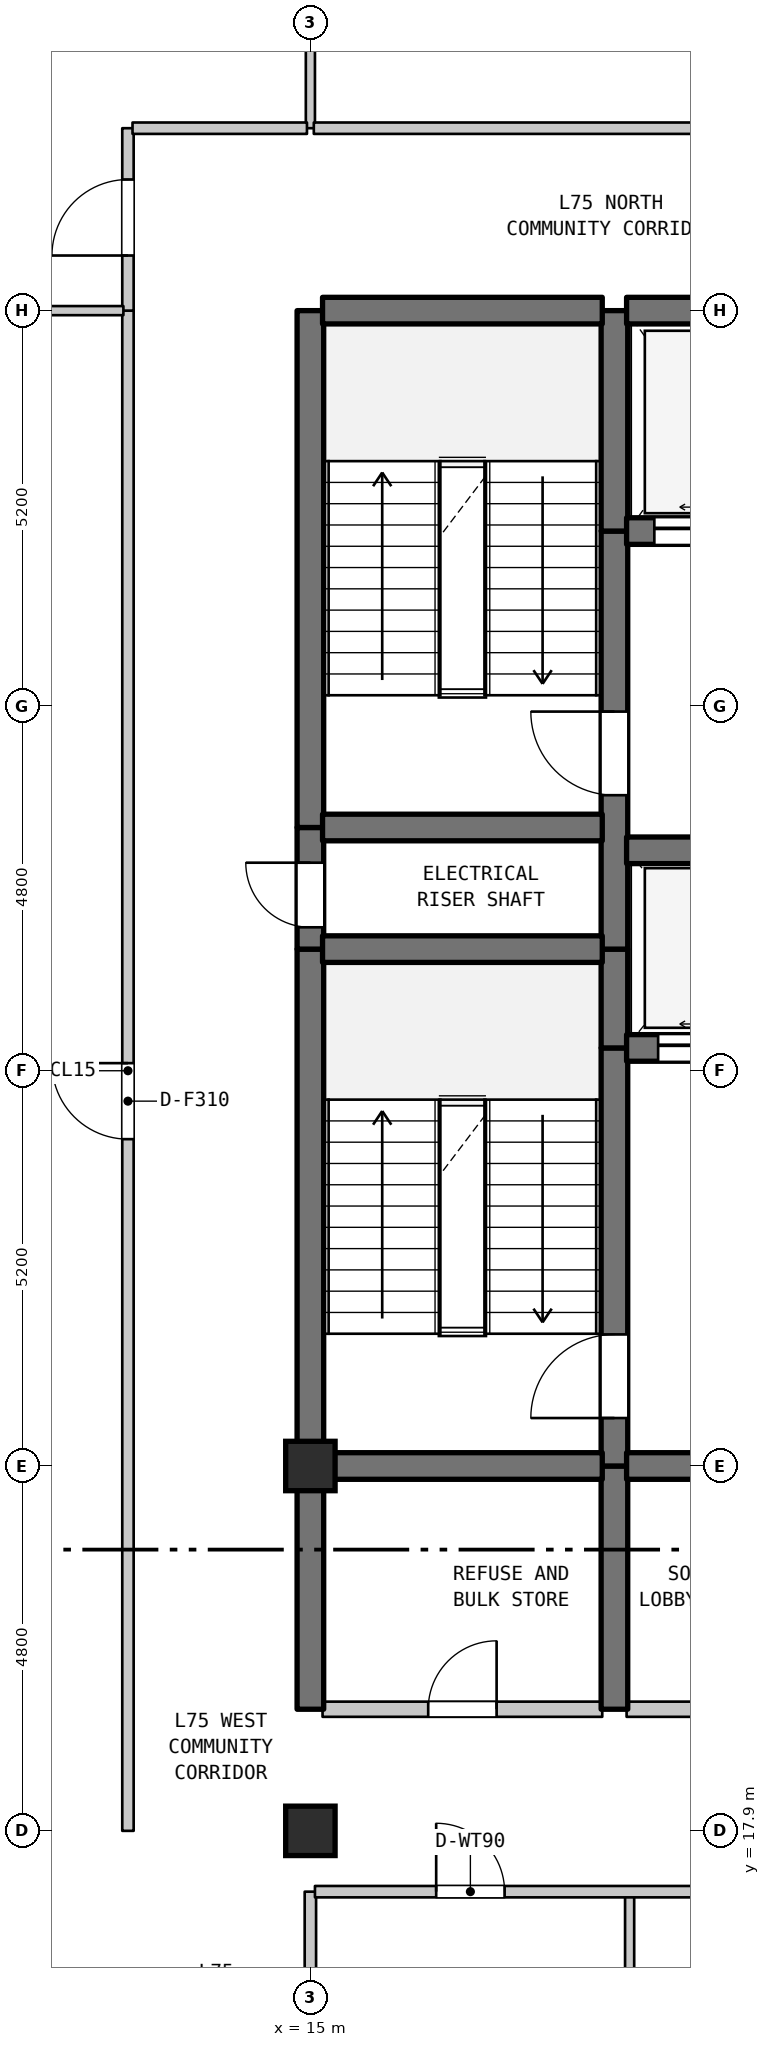
"""IFC4 building model, lengths in metres.
Left out: names, types, materials, properties, quantities, classifications, styles, units other than length and angle.
Written with IfcOpenShell. Run it as: python <this file> out.ifc"""

import sys

from ifc_helpers import new_model, si_unit, direction, frame, frame_2d, origin, origin_2d, place, context, subcontext, project, spatial, rectangle, extrude, element, fill, save


model = new_model("IFC4")
c1 = context("Model", 3, precision=1e-05, world=origin(), true_north=direction((0.0, 1.0)))
c2 = subcontext(c1, "Body", "Model", "MODEL_VIEW")
j1 = project(units=[si_unit("LENGTHUNIT", "METRE"), si_unit("PLANEANGLEUNIT", "RADIAN")], contexts=[c1])
p1 = place(None, origin())
s1 = spatial("IfcSite", under=j1, at=p1, CompositionType="ELEMENT")
p2 = place(p1, origin())
s2 = spatial("IfcBuilding", under=s1, at=p2, CompositionType="ELEMENT")
p3 = place(p2, frame((0.0, 0.0, 299.1)))
s3 = spatial("IfcBuildingStorey", under=s2, at=p3, CompositionType="ELEMENT", Elevation=299.1)
for number, where, z_axis, x_axis in (
    (1, (15.0, 17.9, 0.0), (0.0, 0.0, 1.0), (1.0, 0.0, 0.0)),
    (2, (15.0, 22.7, 0.0), (0.0, 0.0, 1.0), (1.0, 0.0, 0.0)),
):
    element("IfcColumn", number, at=place(p3, frame(where, z_axis=z_axis, x_axis=x_axis)), inside=s3, PredefinedType="COLUMN", context=c2, shape_type="SweptSolid", body=[
        extrude(rectangle(XDim=0.65, YDim=0.65, at=origin_2d()), origin(), (0.0, 0.0, 1.0), 4.5),
    ])
p4 = place(p3, frame((12.6, 17.9, 0.0), z_axis=(0.0, 0.0, 1.0), x_axis=(0.0, 1.0, 0.0)))
e3 = element("IfcWall", 3, at=p4, inside=s3, PredefinedType="STANDARD", context=c2, shape_type="SweptSolid", body=[
    extrude(rectangle(XDim=20.0, YDim=0.15, at=frame_2d((10.0, 0.0))), origin(), (0.0, 0.0, 1.0), 4.19),
])
p5 = place(p4, frame((9.1, 0.0, 0.0)))
e4 = element("IfcOpeningElement", 4, at=p5, cuts=e3, PredefinedType="OPENING", context=c2, shape_type="SweptSolid", body=[
    extrude(rectangle(XDim=1.0, YDim=2.15, at=frame_2d((0.5, 1.075))), frame((0.0, 0.085, 0.0), z_axis=(0.0, -1.0, 0.0), x_axis=(1.0, 0.0, 0.0)), (0.0, 0.0, 1.0), 0.17),
])
p6 = place(p3, frame((12.6, 37.9, 0.0), z_axis=(0.0, 0.0, 1.0), x_axis=(0.0, 1.0, 0.0)))
e5 = element("IfcWall", 5, at=p6, inside=s3, PredefinedType="STANDARD", context=c2, shape_type="SweptSolid", body=[
    extrude(rectangle(XDim=2.4, YDim=0.15, at=frame_2d((1.2, 0.0))), origin(), (0.0, 0.0, 1.0), 4.19),
])
p7 = place(p6, frame((0.725, 0.0, 0.0)))
e6 = element("IfcOpeningElement", 6, at=p7, cuts=e5, PredefinedType="OPENING", context=c2, shape_type="SweptSolid", body=[
    extrude(rectangle(XDim=1.0, YDim=2.15, at=frame_2d((0.5, 1.075))), frame((0.0, 0.085, 0.0), z_axis=(0.0, -1.0, 0.0), x_axis=(1.0, 0.0, 0.0)), (0.0, 0.0, 1.0), 0.17),
])
p8 = place(p3, frame((15.0, 13.0, 0.0), z_axis=(0.0, 0.0, 1.0), x_axis=(0.0, 1.0, 0.0)))
e7 = element("IfcWall", 7, at=p8, inside=s3, PredefinedType="STANDARD", context=c2, shape_type="SweptSolid", body=[
    extrude(rectangle(XDim=4.1, YDim=0.15, at=frame_2d((2.05, 0.0))), origin(), (0.0, 0.0, 1.0), 3.9),
])
p9 = place(p3, frame((15.0, 19.5, 0.0), z_axis=(0.0, 0.0, 1.0), x_axis=(0.0, 1.0, 0.0)))
e8 = element("IfcWall", 8, at=p9, inside=s3, PredefinedType="SHEAR", context=c2, shape_type="SweptSolid", body=[
    extrude(rectangle(XDim=3.2, YDim=0.35, at=frame_2d((1.6, 0.0))), origin(), (0.0, 0.0, 1.0), 4.19),
])
p10 = place(p3, frame((15.0, 22.7, 0.0), z_axis=(0.0, 0.0, 1.0), x_axis=(0.0, 1.0, 0.0)))
e9 = element("IfcWall", 9, at=p10, inside=s3, PredefinedType="SHEAR", context=c2, shape_type="SweptSolid", body=[
    extrude(rectangle(XDim=6.8, YDim=0.35, at=frame_2d((3.4, 0.0))), origin(), (0.0, 0.0, 1.0), 4.19),
])
p11 = place(p3, frame((15.0, 29.5, 0.0), z_axis=(0.0, 0.0, 1.0), x_axis=(0.0, 1.0, 0.0)))
e10 = element("IfcWall", 10, at=p11, inside=s3, PredefinedType="SHEAR", context=c2, shape_type="SweptSolid", body=[
    extrude(rectangle(XDim=1.6, YDim=0.35, at=frame_2d((0.8, 0.0))), origin(), (0.0, 0.0, 1.0), 4.19),
])
p12 = place(p11, frame((0.287, 0.0, 0.0)))
e11 = element("IfcOpeningElement", 11, at=p12, cuts=e10, PredefinedType="OPENING", context=c2, shape_type="SweptSolid", body=[
    extrude(rectangle(XDim=0.85, YDim=2.1, at=frame_2d((0.425, 1.05))), frame((0.0, 0.185, 0.0), z_axis=(0.0, -1.0, 0.0), x_axis=(1.0, 0.0, 0.0)), (0.0, 0.0, 1.0), 0.37),
])
p13 = place(p3, frame((15.0, 31.1, 0.0), z_axis=(0.0, 0.0, 1.0), x_axis=(0.0, 1.0, 0.0)))
e12 = element("IfcWall", 12, at=p13, inside=s3, PredefinedType="SHEAR", context=c2, shape_type="SweptSolid", body=[
    extrude(rectangle(XDim=6.8, YDim=0.35, at=frame_2d((3.4, 0.0))), origin(), (0.0, 0.0, 1.0), 4.19),
])
p14 = place(p3, frame((15.0, 40.3, 0.0), z_axis=(0.0, 0.0, 1.0), x_axis=(0.0, 1.0, 0.0)))
e13 = element("IfcWall", 13, at=p14, inside=s3, PredefinedType="PARTITIONING", context=c2, shape_type="SweptSolid", body=[
    extrude(rectangle(XDim=12.933, YDim=0.12, at=frame_2d((6.466, 0.0))), origin(), (0.0, 0.0, 1.0), 4.19),
])
p15 = place(p3, frame((19.0, 19.5, 0.0), z_axis=(0.0, 0.0, 1.0), x_axis=(0.0, 1.0, 0.0)))
e14 = element("IfcWall", 14, at=p15, inside=s3, PredefinedType="SHEAR", context=c2, shape_type="SweptSolid", body=[
    extrude(rectangle(XDim=3.2, YDim=0.35, at=frame_2d((1.6, 0.0))), origin(), (0.0, 0.0, 1.0), 4.19),
])
p16 = place(p3, frame((19.0, 22.7, 0.0), z_axis=(0.0, 0.0, 1.0), x_axis=(0.0, 1.0, 0.0)))
e15 = element("IfcWall", 15, at=p16, inside=s3, PredefinedType="SHEAR", context=c2, shape_type="SweptSolid", body=[
    extrude(rectangle(XDim=5.5, YDim=0.35, at=frame_2d((2.75, 0.0))), origin(), (0.0, 0.0, 1.0), 4.19),
])
p17 = place(p16, frame((0.631, 0.0, 0.0)))
e16 = element("IfcOpeningElement", 16, at=p17, cuts=e15, PredefinedType="OPENING", context=c2, shape_type="SweptSolid", body=[
    extrude(rectangle(XDim=1.1, YDim=2.15, at=frame_2d((0.55, 1.075))), frame((0.0, 0.185, 0.0), z_axis=(0.0, -1.0, 0.0), x_axis=(1.0, 0.0, 0.0)), (0.0, 0.0, 1.0), 0.37),
])
p18 = place(p3, frame((19.0, 28.2, 0.0), z_axis=(0.0, 0.0, 1.0), x_axis=(0.0, 1.0, 0.0)))
e17 = element("IfcWall", 17, at=p18, inside=s3, PredefinedType="SHEAR", context=c2, shape_type="SweptSolid", body=[
    extrude(rectangle(XDim=1.3, YDim=0.35, at=frame_2d((0.65, 0.0))), origin(), (0.0, 0.0, 1.0), 4.19),
])
p19 = place(p3, frame((19.0, 29.5, 0.0), z_axis=(0.0, 0.0, 1.0), x_axis=(0.0, 1.0, 0.0)))
e18 = element("IfcWall", 18, at=p19, inside=s3, PredefinedType="SHEAR", context=c2, shape_type="SweptSolid", body=[
    extrude(rectangle(XDim=5.5, YDim=0.35, at=frame_2d((2.75, 0.0))), origin(), (0.0, 0.0, 1.0), 4.19),
])
p20 = place(p19, frame((2.025, 0.0, 0.0)))
e19 = element("IfcOpeningElement", 19, at=p20, cuts=e18, PredefinedType="OPENING", context=c2, shape_type="SweptSolid", body=[
    extrude(rectangle(XDim=1.1, YDim=2.15, at=frame_2d((0.55, 1.075))), frame((0.0, 0.185, 0.0), z_axis=(0.0, -1.0, 0.0), x_axis=(1.0, 0.0, 0.0)), (0.0, 0.0, 1.0), 0.37),
])
p21 = place(p3, frame((19.0, 35.0, 0.0), z_axis=(0.0, 0.0, 1.0), x_axis=(0.0, 1.0, 0.0)))
e20 = element("IfcWall", 20, at=p21, inside=s3, PredefinedType="SHEAR", context=c2, shape_type="SweptSolid", body=[
    extrude(rectangle(XDim=2.9, YDim=0.35, at=frame_2d((1.45, 0.0))), origin(), (0.0, 0.0, 1.0), 4.19),
])
p22 = place(p3, frame((19.2, 13.0, 0.0), z_axis=(0.0, 0.0, 1.0), x_axis=(0.0, 1.0, 0.0)))
e21 = element("IfcWall", 21, at=p22, inside=s3, PredefinedType="PARTITIONING", context=c2, shape_type="SweptSolid", body=[
    extrude(rectangle(XDim=4.1, YDim=0.12, at=frame_2d((2.05, 0.0))), origin(), (0.0, 0.0, 1.0), 4.19),
])
p23 = place(p3, frame((15.06, 17.1, 0.0), z_axis=(0.0, 0.0, 1.0), x_axis=(1.0, 0.0, 0.0)))
e22 = element("IfcWall", 22, at=p23, inside=s3, PredefinedType="STANDARD", context=c2, shape_type="SweptSolid", body=[
    extrude(rectangle(XDim=8.295, YDim=0.15, at=frame_2d((4.147, 0.0))), origin(), (0.0, 0.0, 1.0), 4.19),
])
p24 = place(p23, frame((1.595, 0.0, 0.0)))
e23 = element("IfcOpeningElement", 23, at=p24, cuts=e22, PredefinedType="OPENING", context=c2, shape_type="SweptSolid", body=[
    extrude(rectangle(XDim=0.9, YDim=2.1, at=frame_2d((0.45, 1.05))), frame((0.0, 0.085, 0.0), z_axis=(0.0, -1.0, 0.0), x_axis=(1.0, 0.0, 0.0)), (0.0, 0.0, 1.0), 0.17),
])
p25 = place(p23, frame((5.645, 0.0, 0.0)))
e24 = element("IfcOpeningElement", 24, at=p25, cuts=e22, PredefinedType="OPENING", context=c2, shape_type="SweptSolid", body=[
    extrude(rectangle(XDim=0.9, YDim=2.1, at=frame_2d((0.45, 1.05))), frame((0.0, 0.085, 0.0), z_axis=(0.0, -1.0, 0.0), x_axis=(1.0, 0.0, 0.0)), (0.0, 0.0, 1.0), 0.17),
])
p26 = place(p3, frame((15.16, 19.5, 0.0), z_axis=(0.0, 0.0, 1.0), x_axis=(1.0, 0.0, 0.0)))
e25 = element("IfcWall", 25, at=p26, inside=s3, PredefinedType="STANDARD", context=c2, shape_type="SweptSolid", body=[
    extrude(rectangle(XDim=3.68, YDim=0.2, at=frame_2d((1.84, 0.0))), origin(), (0.0, 0.0, 1.0), 4.19),
])
p27 = place(p26, frame((1.39, 0.0, 0.0)))
e26 = element("IfcOpeningElement", 26, at=p27, cuts=e25, PredefinedType="OPENING", context=c2, shape_type="SweptSolid", body=[
    extrude(rectangle(XDim=0.9, YDim=2.15, at=frame_2d((0.45, 1.075))), frame((0.0, 0.11, 0.0), z_axis=(0.0, -1.0, 0.0), x_axis=(1.0, 0.0, 0.0)), (0.0, 0.0, 1.0), 0.22),
])
p28 = place(p3, frame((19.16, 19.5, 0.0), z_axis=(0.0, 0.0, 1.0), x_axis=(1.0, 0.0, 0.0)))
e27 = element("IfcWall", 27, at=p28, inside=s3, PredefinedType="STANDARD", context=c2, shape_type="SweptSolid", body=[
    extrude(rectangle(XDim=4.48, YDim=0.2, at=frame_2d((2.24, 0.0))), origin(), (0.0, 0.0, 1.0), 4.19),
])
p29 = place(p28, frame((1.64, 0.0, 0.0)))
e28 = element("IfcOpeningElement", 28, at=p29, cuts=e27, PredefinedType="OPENING", context=c2, shape_type="SweptSolid", body=[
    extrude(rectangle(XDim=1.2, YDim=2.2, at=frame_2d((0.6, 1.1))), frame((0.0, 0.11, 0.0), z_axis=(0.0, -1.0, 0.0), x_axis=(1.0, 0.0, 0.0)), (0.0, 0.0, 1.0), 0.22),
])
p30 = place(p3, frame((15.16, 22.7, 0.0), z_axis=(0.0, 0.0, 1.0), x_axis=(1.0, 0.0, 0.0)))
e29 = element("IfcWall", 29, at=p30, inside=s3, PredefinedType="SHEAR", context=c2, shape_type="SweptSolid", body=[
    extrude(rectangle(XDim=3.68, YDim=0.35, at=frame_2d((1.84, 0.0))), origin(), (0.0, 0.0, 1.0), 4.19),
])
p31 = place(p3, frame((19.16, 22.7, 0.0), z_axis=(0.0, 0.0, 1.0), x_axis=(1.0, 0.0, 0.0)))
e30 = element("IfcWall", 30, at=p31, inside=s3, PredefinedType="SHEAR", context=c2, shape_type="SweptSolid", body=[
    extrude(rectangle(XDim=4.48, YDim=0.35, at=frame_2d((2.24, 0.0))), origin(), (0.0, 0.0, 1.0), 4.19),
])
p32 = place(p31, frame((1.64, 0.0, 0.0)))
e31 = element("IfcOpeningElement", 31, at=p32, cuts=e30, PredefinedType="OPENING", context=c2, shape_type="SweptSolid", body=[
    extrude(rectangle(XDim=1.2, YDim=2.2, at=frame_2d((0.6, 1.1))), frame((0.0, 0.185, 0.0), z_axis=(0.0, -1.0, 0.0), x_axis=(1.0, 0.0, 0.0)), (0.0, 0.0, 1.0), 0.37),
])
p33 = place(p3, frame((19.16, 28.2, 0.0), z_axis=(0.0, 0.0, 1.0), x_axis=(1.0, 0.0, 0.0)))
e32 = element("IfcWall", 32, at=p33, inside=s3, PredefinedType="SHEAR", context=c2, shape_type="SweptSolid", body=[
    extrude(rectangle(XDim=4.48, YDim=0.35, at=frame_2d((2.24, 0.0))), origin(), (0.0, 0.0, 1.0), 4.19),
])
p34 = place(p33, frame((0.415, 0.0, 0.0)))
e33 = element("IfcOpeningElement", 33, at=p34, cuts=e32, PredefinedType="OPENING", context=c2, shape_type="SweptSolid", body=[
    extrude(rectangle(XDim=1.25, YDim=2.2, at=frame_2d((0.625, 1.1))), frame((0.0, 0.185, 0.0), z_axis=(0.0, -1.0, 0.0), x_axis=(1.0, 0.0, 0.0)), (0.0, 0.0, 1.0), 0.37),
])
p35 = place(p33, frame((2.815, 0.0, 0.0)))
e34 = element("IfcOpeningElement", 34, at=p35, cuts=e32, PredefinedType="OPENING", context=c2, shape_type="SweptSolid", body=[
    extrude(rectangle(XDim=1.25, YDim=2.2, at=frame_2d((0.625, 1.1))), frame((0.0, 0.185, 0.0), z_axis=(0.0, -1.0, 0.0), x_axis=(1.0, 0.0, 0.0)), (0.0, 0.0, 1.0), 0.37),
])
p36 = place(p3, frame((15.16, 29.5, 0.0), z_axis=(0.0, 0.0, 1.0), x_axis=(1.0, 0.0, 0.0)))
e35 = element("IfcWall", 35, at=p36, inside=s3, PredefinedType="SHEAR", context=c2, shape_type="SweptSolid", body=[
    extrude(rectangle(XDim=3.68, YDim=0.35, at=frame_2d((1.84, 0.0))), origin(), (0.0, 0.0, 1.0), 4.19),
])
p37 = place(p3, frame((19.16, 30.8, 0.0), z_axis=(0.0, 0.0, 1.0), x_axis=(1.0, 0.0, 0.0)))
e36 = element("IfcWall", 36, at=p37, inside=s3, PredefinedType="SHEAR", context=c2, shape_type="SweptSolid", body=[
    extrude(rectangle(XDim=4.48, YDim=0.35, at=frame_2d((2.24, 0.0))), origin(), (0.0, 0.0, 1.0), 4.19),
])
p38 = place(p3, frame((15.16, 31.1, 0.0), z_axis=(0.0, 0.0, 1.0), x_axis=(1.0, 0.0, 0.0)))
e37 = element("IfcWall", 37, at=p38, inside=s3, PredefinedType="SHEAR", context=c2, shape_type="SweptSolid", body=[
    extrude(rectangle(XDim=3.68, YDim=0.35, at=frame_2d((1.84, 0.0))), origin(), (0.0, 0.0, 1.0), 4.19),
])
p39 = place(p3, frame((19.16, 35.0, 0.0), z_axis=(0.0, 0.0, 1.0), x_axis=(1.0, 0.0, 0.0)))
e38 = element("IfcWall", 38, at=p39, inside=s3, PredefinedType="SHEAR", context=c2, shape_type="SweptSolid", body=[
    extrude(rectangle(XDim=4.48, YDim=0.35, at=frame_2d((2.24, 0.0))), origin(), (0.0, 0.0, 1.0), 4.19),
])
p40 = place(p39, frame((0.365, 0.0, 0.0)))
e39 = element("IfcOpeningElement", 39, at=p40, cuts=e38, PredefinedType="OPENING", context=c2, shape_type="SweptSolid", body=[
    extrude(rectangle(XDim=1.35, YDim=2.2, at=frame_2d((0.675, 1.1))), frame((0.0, 0.185, 0.0), z_axis=(0.0, -1.0, 0.0), x_axis=(1.0, 0.0, 0.0)), (0.0, 0.0, 1.0), 0.37),
])
p41 = place(p39, frame((2.765, 0.0, 0.0)))
e40 = element("IfcOpeningElement", 40, at=p41, cuts=e38, PredefinedType="OPENING", context=c2, shape_type="SweptSolid", body=[
    extrude(rectangle(XDim=1.35, YDim=2.2, at=frame_2d((0.675, 1.1))), frame((0.0, 0.185, 0.0), z_axis=(0.0, -1.0, 0.0), x_axis=(1.0, 0.0, 0.0)), (0.0, 0.0, 1.0), 0.37),
])
p42 = place(p3, frame((8.856, 37.9, 0.0), z_axis=(0.0, 0.0, 1.0), x_axis=(1.0, 0.0, 0.0)))
e41 = element("IfcWall", 41, at=p42, inside=s3, PredefinedType="PARTITIONING", context=c2, shape_type="SweptSolid", body=[
    extrude(rectangle(XDim=3.684, YDim=0.12, at=frame_2d((1.842, 0.0))), origin(), (0.0, 0.0, 1.0), 3.84),
])
p43 = place(p3, frame((15.16, 37.9, 0.0), z_axis=(0.0, 0.0, 1.0), x_axis=(1.0, 0.0, 0.0)))
e42 = element("IfcWall", 42, at=p43, inside=s3, PredefinedType="SHEAR", context=c2, shape_type="SweptSolid", body=[
    extrude(rectangle(XDim=3.68, YDim=0.35, at=frame_2d((1.84, 0.0))), origin(), (0.0, 0.0, 1.0), 4.19),
])
p44 = place(p3, frame((19.16, 37.9, 0.0), z_axis=(0.0, 0.0, 1.0), x_axis=(1.0, 0.0, 0.0)))
e43 = element("IfcWall", 43, at=p44, inside=s3, PredefinedType="SHEAR", context=c2, shape_type="SweptSolid", body=[
    extrude(rectangle(XDim=4.48, YDim=0.35, at=frame_2d((2.24, 0.0))), origin(), (0.0, 0.0, 1.0), 4.19),
])
p45 = place(p3, frame((12.66, 40.3, 0.0), z_axis=(0.0, 0.0, 1.0), x_axis=(1.0, 0.0, 0.0)))
e44 = element("IfcWall", 44, at=p45, inside=s3, PredefinedType="STANDARD", context=c2, shape_type="SweptSolid", body=[
    extrude(rectangle(XDim=2.295, YDim=0.15, at=frame_2d((1.147, 0.0))), origin(), (0.0, 0.0, 1.0), 4.19),
])
p46 = place(p3, frame((15.045, 40.3, 0.0), z_axis=(0.0, 0.0, 1.0), x_axis=(1.0, 0.0, 0.0)))
e45 = element("IfcWall", 45, at=p46, inside=s3, PredefinedType="STANDARD", context=c2, shape_type="SweptSolid", body=[
    extrude(rectangle(XDim=17.895, YDim=0.15, at=frame_2d((8.948, 0.0))), origin(), (0.0, 0.0, 1.0), 4.19),
])
p47 = place(p46, frame((9.205, 0.0, 0.0)))
e46 = element("IfcOpeningElement", 46, at=p47, cuts=e45, PredefinedType="OPENING", context=c2, shape_type="SweptSolid", body=[
    extrude(rectangle(XDim=1.0, YDim=2.15, at=frame_2d((0.5, 1.075))), frame((0.0, 0.085, 0.0), z_axis=(0.0, -1.0, 0.0), x_axis=(1.0, 0.0, 0.0)), (0.0, 0.0, 1.0), 0.17),
])
p48 = place(p5, origin())
e47 = element("IfcDoor", 47, at=p48, inside=s3, OperationType="SINGLE_SWING_RIGHT", PredefinedType="DOOR", context=c2, shape_type="SweptSolid", body=[
    extrude(rectangle(XDim=1.0, YDim=2.15, at=frame_2d((0.5, 1.075))), frame((0.0, 0.025, 0.0), z_axis=(0.0, -1.0, 0.0), x_axis=(1.0, 0.0, 0.0)), (0.0, 0.0, 1.0), 0.05),
])
fill(e4, e47)
p49 = place(p7, origin())
e48 = element("IfcDoor", 48, at=p49, inside=s3, OperationType="SINGLE_SWING_LEFT", PredefinedType="DOOR", context=c2, shape_type="SweptSolid", body=[
    extrude(rectangle(XDim=1.0, YDim=2.15, at=frame_2d((0.5, 1.075))), frame((0.0, 0.025, 0.0), z_axis=(0.0, -1.0, 0.0), x_axis=(1.0, 0.0, 0.0)), (0.0, 0.0, 1.0), 0.05),
])
fill(e6, e48)
p50 = place(p12, origin())
e49 = element("IfcDoor", 49, at=p50, inside=s3, OperationType="SINGLE_SWING_RIGHT", PredefinedType="DOOR", context=c2, shape_type="SweptSolid", body=[
    extrude(rectangle(XDim=0.85, YDim=2.1, at=frame_2d((0.425, 1.05))), frame((0.0, 0.025, 0.0), z_axis=(0.0, -1.0, 0.0), x_axis=(1.0, 0.0, 0.0)), (0.0, 0.0, 1.0), 0.05),
])
fill(e11, e49)
p51 = place(p17, origin())
e50 = element("IfcDoor", 50, at=p51, inside=s3, OperationType="SINGLE_SWING_LEFT", PredefinedType="DOOR", context=c2, shape_type="SweptSolid", body=[
    extrude(rectangle(XDim=1.1, YDim=2.15, at=frame_2d((0.55, 1.075))), frame((0.0, 0.025, 0.0), z_axis=(0.0, -1.0, 0.0), x_axis=(1.0, 0.0, 0.0)), (0.0, 0.0, 1.0), 0.05),
])
fill(e16, e50)
p52 = place(p20, origin())
e51 = element("IfcDoor", 51, at=p52, inside=s3, OperationType="SINGLE_SWING_RIGHT", PredefinedType="DOOR", context=c2, shape_type="SweptSolid", body=[
    extrude(rectangle(XDim=1.1, YDim=2.15, at=frame_2d((0.55, 1.075))), frame((0.0, 0.025, 0.0), z_axis=(0.0, -1.0, 0.0), x_axis=(1.0, 0.0, 0.0)), (0.0, 0.0, 1.0), 0.05),
])
fill(e19, e51)
p53 = place(p24, origin())
e52 = element("IfcDoor", 52, at=p53, inside=s3, OperationType="SINGLE_SWING_LEFT", PredefinedType="DOOR", context=c2, shape_type="SweptSolid", body=[
    extrude(rectangle(XDim=0.9, YDim=2.1, at=frame_2d((0.45, 1.05))), frame((0.0, 0.025, 0.0), z_axis=(0.0, -1.0, 0.0), x_axis=(1.0, 0.0, 0.0)), (0.0, 0.0, 1.0), 0.05),
])
fill(e23, e52)
p54 = place(p27, origin())
e53 = element("IfcDoor", 53, at=p54, inside=s3, OperationType="SINGLE_SWING_RIGHT", PredefinedType="DOOR", context=c2, shape_type="SweptSolid", body=[
    extrude(rectangle(XDim=0.9, YDim=2.15, at=frame_2d((0.45, 1.075))), frame((0.0, 0.025, 0.0), z_axis=(0.0, -1.0, 0.0), x_axis=(1.0, 0.0, 0.0)), (0.0, 0.0, 1.0), 0.05),
])
fill(e26, e53)
p55 = place(p34, origin())
e54 = element("IfcDoor", 54, at=p55, inside=s3, OperationType="DOUBLE_DOOR_SLIDING", PredefinedType="DOOR", context=c2, shape_type="SweptSolid", body=[
    extrude(rectangle(XDim=1.25, YDim=2.2, at=frame_2d((0.625, 1.1))), frame((0.0, 0.025, 0.0), z_axis=(0.0, -1.0, 0.0), x_axis=(1.0, 0.0, 0.0)), (0.0, 0.0, 1.0), 0.05),
])
fill(e33, e54)
p56 = place(p40, origin())
e55 = element("IfcDoor", 55, at=p56, inside=s3, OperationType="DOUBLE_DOOR_SLIDING", PredefinedType="DOOR", context=c2, shape_type="SweptSolid", body=[
    extrude(rectangle(XDim=1.35, YDim=2.2, at=frame_2d((0.675, 1.1))), frame((0.0, 0.025, 0.0), z_axis=(0.0, -1.0, 0.0), x_axis=(1.0, 0.0, 0.0)), (0.0, 0.0, 1.0), 0.05),
])
fill(e39, e55)
save(model, sys.argv[1])
